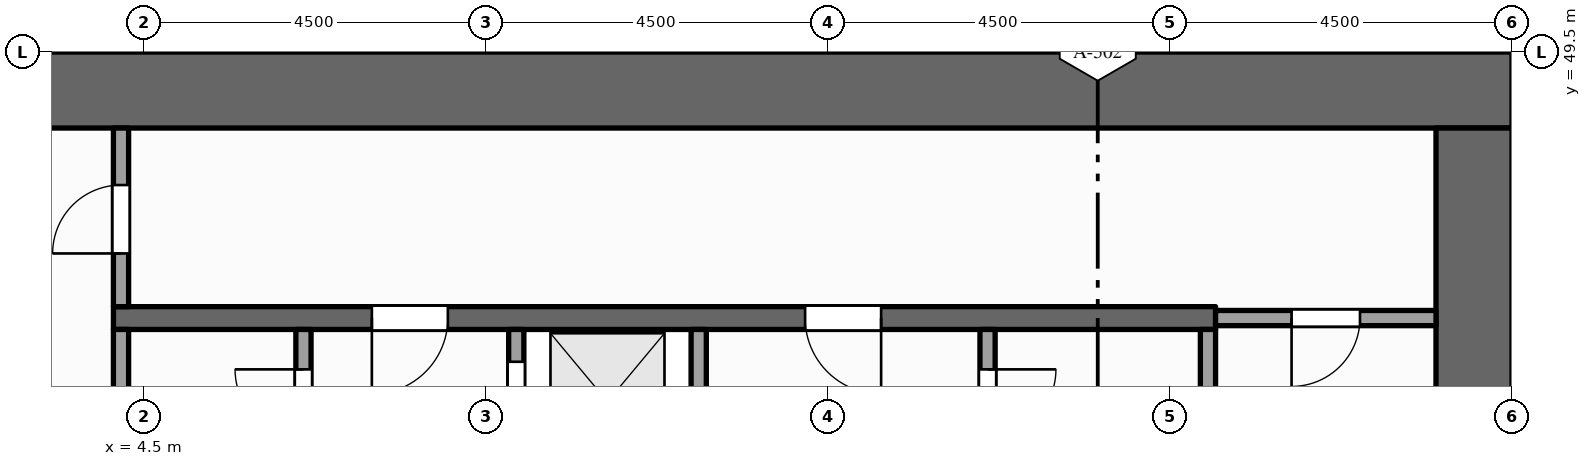
"""IFC4 building model, lengths in metres.
Left out: names, types, materials, properties, quantities, classifications, styles, units other than length and angle.
Written with IfcOpenShell. Run it as: python <this file> out.ifc"""

import sys

from ifc_helpers import new_model, si_unit, direction, frame, frame_2d, origin, place, context, subcontext, project, spatial, rectangle, extrude, element, fill, save


model = new_model("IFC4")
c1 = context("Model", 3, precision=1e-05, world=origin(), true_north=direction((0.0, 1.0)))
c2 = subcontext(c1, "Body", "Model", "MODEL_VIEW")
j1 = project(units=[si_unit("LENGTHUNIT", "METRE"), si_unit("PLANEANGLEUNIT", "RADIAN")], contexts=[c1])
p1 = place(None, origin())
s1 = spatial("IfcSite", under=j1, at=p1, CompositionType="ELEMENT")
p2 = place(p1, origin())
s2 = spatial("IfcBuilding", under=s1, at=p2, CompositionType="ELEMENT")
p3 = place(p2, frame((0.0, 0.0, 195.0)))
s3 = spatial("IfcBuildingStorey", under=s2, at=p3, CompositionType="ELEMENT", Elevation=195.0)
p4 = place(p3, frame((0.0, 49.0, -0.15), z_axis=(0.0, 0.0, 1.0), x_axis=(1.0, 0.0, 0.0)))
e1 = element("IfcWall", 1, at=p4, inside=s3, PredefinedType="SHEAR", context=c2, shape_type="SweptSolid", body=[
    extrude(rectangle(XDim=22.5, YDim=1.0, at=frame_2d((11.25, 0.0))), origin(), (0.0, 0.0, 1.0), 4.0),
])
p5 = place(p3, frame((22.0, 37.0, -0.15), z_axis=(0.0, 0.0, 1.0), x_axis=(0.0, 1.0, 0.0)))
e2 = element("IfcWall", 2, at=p5, inside=s3, PredefinedType="SHEAR", context=c2, shape_type="SweptSolid", body=[
    extrude(rectangle(XDim=11.5, YDim=1.0, at=frame_2d((5.75, 0.0))), origin(), (0.0, 0.0, 1.0), 4.0),
])
p6 = place(p3, frame((4.2, 43.525, 0.0), z_axis=(0.0, 0.0, 1.0), x_axis=(0.0, 1.0, 0.0)))
e3 = element("IfcWall", 3, at=p6, inside=s3, PredefinedType="PARTITIONING", context=c2, shape_type="SweptSolid", body=[
    extrude(rectangle(XDim=2.325, YDim=0.2, at=frame_2d((1.163, 0.0))), origin(), (0.0, 0.0, 1.0), 3.85),
])
p7 = place(p3, frame((4.2, 46.15, 0.0), z_axis=(0.0, 0.0, 1.0), x_axis=(0.0, 1.0, 0.0)))
e4 = element("IfcWall", 4, at=p7, inside=s3, PredefinedType="PARTITIONING", context=c2, shape_type="SweptSolid", body=[
    extrude(rectangle(XDim=2.35, YDim=0.2, at=frame_2d((1.175, 0.0))), origin(), (0.0, 0.0, 1.0), 3.85),
])
p8 = place(p7, frame((0.7, 0.0, 0.0)))
e5 = element("IfcOpeningElement", 5, at=p8, cuts=e4, PredefinedType="OPENING", context=c2, shape_type="SweptSolid", body=[
    extrude(rectangle(XDim=0.9, YDim=2.1, at=frame_2d((0.45, 1.05))), frame((0.0, 0.11, 0.0), z_axis=(0.0, -1.0, 0.0), x_axis=(1.0, 0.0, 0.0)), (0.0, 0.0, 1.0), 0.22),
])
p9 = place(p3, frame((6.6, 37.0, 0.0), z_axis=(0.0, 0.0, 1.0), x_axis=(0.0, 1.0, 0.0)))
e6 = element("IfcWall", 6, at=p9, inside=s3, PredefinedType="PARTITIONING", context=c2, shape_type="SweptSolid", body=[
    extrude(rectangle(XDim=8.85, YDim=0.2, at=frame_2d((4.425, 0.0))), origin(), (0.0, 0.0, 1.0), 3.85),
])
p10 = place(p9, frame((2.9, 0.0, 0.0)))
e7 = element("IfcOpeningElement", 7, at=p10, cuts=e6, PredefinedType="OPENING", context=c2, shape_type="SweptSolid", body=[
    extrude(rectangle(XDim=0.9, YDim=2.1, at=frame_2d((0.45, 1.05))), frame((0.0, 0.11, 0.0), z_axis=(0.0, -1.0, 0.0), x_axis=(1.0, 0.0, 0.0)), (0.0, 0.0, 1.0), 0.22),
])
p11 = place(p9, frame((7.425, 0.0, 0.0)))
e8 = element("IfcOpeningElement", 8, at=p11, cuts=e6, PredefinedType="OPENING", context=c2, shape_type="SweptSolid", body=[
    extrude(rectangle(XDim=0.9, YDim=2.1, at=frame_2d((0.45, 1.05))), frame((0.0, 0.11, 0.0), z_axis=(0.0, -1.0, 0.0), x_axis=(1.0, 0.0, 0.0)), (0.0, 0.0, 1.0), 0.22),
])
p12 = place(p3, frame((9.4, 37.0, 0.0), z_axis=(0.0, 0.0, 1.0), x_axis=(0.0, 1.0, 0.0)))
e9 = element("IfcWall", 9, at=p12, inside=s3, PredefinedType="SOLIDWALL", context=c2, shape_type="SweptSolid", body=[
    extrude(rectangle(XDim=8.85, YDim=0.2, at=frame_2d((4.425, 0.0))), origin(), (0.0, 0.0, 1.0), 3.85),
])
p13 = place(p12, frame((0.6, 0.0, 0.012)))
e10 = element("IfcOpeningElement", 10, at=p13, cuts=e9, PredefinedType="OPENING", context=c2, shape_type="SweptSolid", body=[
    extrude(rectangle(XDim=1.1, YDim=2.1, at=frame_2d((0.55, 1.05))), frame((0.0, 0.11, 0.0), z_axis=(0.0, -1.0, 0.0), x_axis=(1.0, 0.0, 0.0)), (0.0, 0.0, 1.0), 0.22),
])
p14 = place(p12, frame((2.95, 0.0, 0.012)))
e11 = element("IfcOpeningElement", 11, at=p14, cuts=e9, PredefinedType="OPENING", context=c2, shape_type="SweptSolid", body=[
    extrude(rectangle(XDim=1.1, YDim=2.1, at=frame_2d((0.55, 1.05))), frame((0.0, 0.11, 0.0), z_axis=(0.0, -1.0, 0.0), x_axis=(1.0, 0.0, 0.0)), (0.0, 0.0, 1.0), 0.22),
])
p15 = place(p12, frame((5.15, 0.0, 0.012)))
e12 = element("IfcOpeningElement", 12, at=p15, cuts=e9, PredefinedType="OPENING", context=c2, shape_type="SweptSolid", body=[
    extrude(rectangle(XDim=1.1, YDim=2.1, at=frame_2d((0.55, 1.05))), frame((0.0, 0.11, 0.0), z_axis=(0.0, -1.0, 0.0), x_axis=(1.0, 0.0, 0.0)), (0.0, 0.0, 1.0), 0.22),
])
p16 = place(p12, frame((7.325, 0.0, 0.012)))
e13 = element("IfcOpeningElement", 13, at=p16, cuts=e9, PredefinedType="OPENING", context=c2, shape_type="SweptSolid", body=[
    extrude(rectangle(XDim=1.1, YDim=2.1, at=frame_2d((0.55, 1.05))), frame((0.0, 0.11, 0.0), z_axis=(0.0, -1.0, 0.0), x_axis=(1.0, 0.0, 0.0)), (0.0, 0.0, 1.0), 0.22),
])
p17 = place(p3, frame((11.8, 37.0, 0.0), z_axis=(0.0, 0.0, 1.0), x_axis=(0.0, 1.0, 0.0)))
e14 = element("IfcWall", 14, at=p17, inside=s3, PredefinedType="SOLIDWALL", context=c2, shape_type="SweptSolid", body=[
    extrude(rectangle(XDim=8.85, YDim=0.2, at=frame_2d((4.425, 0.0))), origin(), (0.0, 0.0, 1.0), 3.85),
])
p18 = place(p3, frame((15.6, 43.9, 0.0), z_axis=(0.0, 0.0, 1.0), x_axis=(0.0, 1.0, 0.0)))
e15 = element("IfcWall", 15, at=p18, inside=s3, PredefinedType="PARTITIONING", context=c2, shape_type="SweptSolid", body=[
    extrude(rectangle(XDim=1.95, YDim=0.2, at=frame_2d((0.975, 0.0))), origin(), (0.0, 0.0, 1.0), 3.85),
])
p19 = place(p18, frame((0.525, 0.0, 0.0)))
e16 = element("IfcOpeningElement", 16, at=p19, cuts=e15, PredefinedType="OPENING", context=c2, shape_type="SweptSolid", body=[
    extrude(rectangle(XDim=0.9, YDim=2.1, at=frame_2d((0.45, 1.05))), frame((0.0, 0.11, 0.0), z_axis=(0.0, -1.0, 0.0), x_axis=(1.0, 0.0, 0.0)), (0.0, 0.0, 1.0), 0.22),
])
p20 = place(p3, frame((18.5, 43.9, 0.0), z_axis=(0.0, 0.0, 1.0), x_axis=(0.0, 1.0, 0.0)))
e17 = element("IfcWall", 17, at=p20, inside=s3, PredefinedType="PARTITIONING", context=c2, shape_type="SweptSolid", body=[
    extrude(rectangle(XDim=1.95, YDim=0.2, at=frame_2d((0.975, 0.0))), origin(), (0.0, 0.0, 1.0), 3.85),
])
p21 = place(p3, frame((4.1, 46.0, 0.0), z_axis=(0.0, 0.0, 1.0), x_axis=(1.0, 0.0, 0.0)))
e18 = element("IfcWall", 18, at=p21, inside=s3, PredefinedType="SHEAR", context=c2, shape_type="SweptSolid", body=[
    extrude(rectangle(XDim=14.5, YDim=0.3, at=frame_2d((7.25, 0.0))), origin(), (0.0, 0.0, 1.0), 3.85),
])
p22 = place(p21, frame((3.4, 0.0, 0.0)))
e19 = element("IfcOpeningElement", 19, at=p22, cuts=e18, PredefinedType="OPENING", context=c2, shape_type="SweptSolid", body=[
    extrude(rectangle(XDim=1.0, YDim=2.1, at=frame_2d((0.5, 1.05))), frame((0.0, 0.16, 0.0), z_axis=(0.0, -1.0, 0.0), x_axis=(1.0, 0.0, 0.0)), (0.0, 0.0, 1.0), 0.32),
])
p23 = place(p21, frame((9.1, 0.0, 0.0)))
e20 = element("IfcOpeningElement", 20, at=p23, cuts=e18, PredefinedType="OPENING", context=c2, shape_type="SweptSolid", body=[
    extrude(rectangle(XDim=1.0, YDim=2.1, at=frame_2d((0.5, 1.05))), frame((0.0, 0.16, 0.0), z_axis=(0.0, -1.0, 0.0), x_axis=(1.0, 0.0, 0.0)), (0.0, 0.0, 1.0), 0.32),
])
p24 = place(p3, frame((18.6, 46.0, 0.0), z_axis=(0.0, 0.0, 1.0), x_axis=(1.0, 0.0, 0.0)))
e21 = element("IfcWall", 21, at=p24, inside=s3, PredefinedType="PARTITIONING", context=c2, shape_type="SweptSolid", body=[
    extrude(rectangle(XDim=2.9, YDim=0.2, at=frame_2d((1.45, 0.0))), origin(), (0.0, 0.0, 1.0), 3.85),
])
p25 = place(p24, frame((1.0, 0.0, 0.0)))
e22 = element("IfcOpeningElement", 22, at=p25, cuts=e21, PredefinedType="OPENING", context=c2, shape_type="SweptSolid", body=[
    extrude(rectangle(XDim=0.9, YDim=2.1, at=frame_2d((0.45, 1.05))), frame((0.0, 0.11, 0.0), z_axis=(0.0, -1.0, 0.0), x_axis=(1.0, 0.0, 0.0)), (0.0, 0.0, 1.0), 0.22),
])
p26 = place(p16, origin())
e23 = element("IfcDoor", 23, at=p26, inside=s3, OperationType="SLIDING_TO_LEFT", PredefinedType="DOOR", context=c2, shape_type="SweptSolid", body=[
    extrude(rectangle(XDim=1.1, YDim=2.1, at=frame_2d((0.55, 1.05))), frame((0.0, 0.025, 0.0), z_axis=(0.0, -1.0, 0.0), x_axis=(1.0, 0.0, 0.0)), (0.0, 0.0, 1.0), 0.05),
])
fill(e13, e23)
p27 = place(p22, origin())
e24 = element("IfcDoor", 24, at=p27, inside=s3, OperationType="SINGLE_SWING_LEFT", PredefinedType="DOOR", context=c2, shape_type="SweptSolid", body=[
    extrude(rectangle(XDim=1.0, YDim=2.1, at=frame_2d((0.5, 1.05))), frame((0.0, 0.025, 0.0), z_axis=(0.0, -1.0, 0.0), x_axis=(1.0, 0.0, 0.0)), (0.0, 0.0, 1.0), 0.05),
])
fill(e19, e24)
p28 = place(p23, origin())
e25 = element("IfcDoor", 25, at=p28, inside=s3, OperationType="SINGLE_SWING_RIGHT", PredefinedType="DOOR", context=c2, shape_type="SweptSolid", body=[
    extrude(rectangle(XDim=1.0, YDim=2.1, at=frame_2d((0.5, 1.05))), frame((0.0, 0.025, 0.0), z_axis=(0.0, -1.0, 0.0), x_axis=(1.0, 0.0, 0.0)), (0.0, 0.0, 1.0), 0.05),
])
fill(e20, e25)
p29 = place(p8, origin())
e26 = element("IfcDoor", 26, at=p29, inside=s3, OperationType="SINGLE_SWING_LEFT", PredefinedType="DOOR", context=c2, shape_type="SweptSolid", body=[
    extrude(rectangle(XDim=0.9, YDim=2.1, at=frame_2d((0.45, 1.05))), frame((0.0, 0.025, 0.0), z_axis=(0.0, -1.0, 0.0), x_axis=(1.0, 0.0, 0.0)), (0.0, 0.0, 1.0), 0.05),
])
fill(e5, e26)
p30 = place(p25, origin())
e27 = element("IfcDoor", 27, at=p30, inside=s3, OperationType="SINGLE_SWING_LEFT", PredefinedType="DOOR", context=c2, shape_type="SweptSolid", body=[
    extrude(rectangle(XDim=0.9, YDim=2.1, at=frame_2d((0.45, 1.05))), frame((0.0, 0.025, 0.0), z_axis=(0.0, -1.0, 0.0), x_axis=(1.0, 0.0, 0.0)), (0.0, 0.0, 1.0), 0.05),
])
fill(e22, e27)
p31 = place(p11, origin())
e28 = element("IfcDoor", 28, at=p31, inside=s3, OperationType="SINGLE_SWING_RIGHT", PredefinedType="DOOR", context=c2, shape_type="SweptSolid", body=[
    extrude(rectangle(XDim=0.9, YDim=2.1, at=frame_2d((0.45, 1.05))), frame((0.0, 0.025, 0.0), z_axis=(0.0, -1.0, 0.0), x_axis=(1.0, 0.0, 0.0)), (0.0, 0.0, 1.0), 0.05),
])
fill(e8, e28)
p32 = place(p19, origin())
e29 = element("IfcDoor", 29, at=p32, inside=s3, OperationType="SINGLE_SWING_RIGHT", PredefinedType="DOOR", context=c2, shape_type="SweptSolid", body=[
    extrude(rectangle(XDim=0.9, YDim=2.1, at=frame_2d((0.45, 1.05))), frame((0.0, 0.025, 0.0), z_axis=(0.0, -1.0, 0.0), x_axis=(1.0, 0.0, 0.0)), (0.0, 0.0, 1.0), 0.05),
])
fill(e16, e29)
save(model, sys.argv[1])
